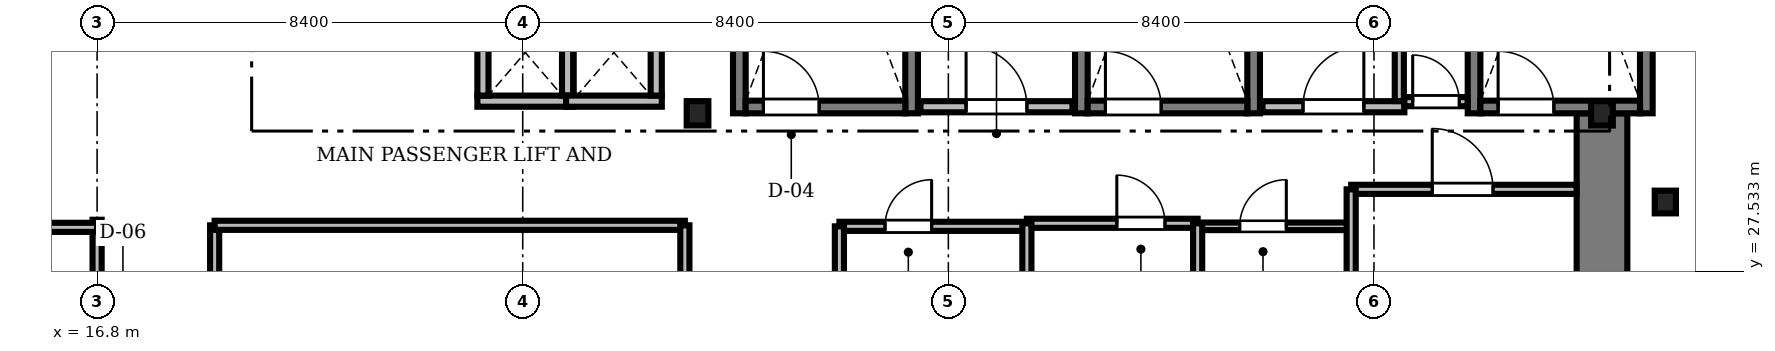
"""IFC4 building model, lengths in metres.
Left out: names, types, materials, properties, quantities, classifications, styles, units other than length and angle.
Written with IfcOpenShell. Run it as: python <this file> out.ifc"""

import sys

from ifc_helpers import new_model, si_unit, direction, frame, frame_2d, origin, origin_2d, place, context, subcontext, project, spatial, rectangle, i_section, extrude, source, transform, mapped, element, fill, save


model = new_model("IFC4")
c1 = context("Model", 3, precision=1e-05, world=origin(), true_north=direction((0.0, 1.0)))
c2 = subcontext(c1, "Body", "Model", "MODEL_VIEW")
j1 = project(units=[si_unit("LENGTHUNIT", "METRE"), si_unit("PLANEANGLEUNIT", "RADIAN")], contexts=[c1])
p1 = place(None, origin())
s1 = spatial("IfcSite", under=j1, at=p1, CompositionType="ELEMENT")
p2 = place(p1, origin())
s2 = spatial("IfcBuilding", under=s1, at=p2, CompositionType="ELEMENT")
p3 = place(p2, frame((0.0, 0.0, 56.8)))
s3 = spatial("IfcBuildingStorey", under=s2, at=p3, CompositionType="ELEMENT", Elevation=56.8)
m1 = source(origin(), c2, "Body", "SweptSolid", [
    extrude(rectangle(XDim=13.15, YDim=1.0, at=frame_2d((6.575, 0.0))), origin(), (0.0, 0.0, 1.0), 3.41),
])
p4 = place(p3, frame((46.5, 17.5, 0.0), z_axis=(0.0, 0.0, 1.0), x_axis=(0.0, 1.0, 0.0)))
e1 = element("IfcWall", 1, at=p4, inside=s3, PredefinedType="SHEAR", context=c2, shape_type="MappedRepresentation", body=[
    mapped(m1, transform((0.0, 0.0, 0.0), scale=1.0)),
])
m2 = source(origin(), c2, "Body", "SweptSolid", [
    extrude(i_section(OverallWidth=0.428, OverallDepth=0.481, WebThickness=0.04, FlangeThickness=0.063, FilletRadius=0.015, at=origin_2d()), origin(), (0.0, 0.0, 1.0), 3.41),
])
for number, where, z_axis, x_axis in (
    (2, (28.65, 30.65, 0.0), (0.0, 0.0, 1.0), (1.0, 0.0, 0.0)),
    (3, (46.5, 30.65, 0.0), (0.0, 0.0, 1.0), (1.0, 0.0, 0.0)),
):
    element("IfcColumn", number, at=place(p3, frame(where, z_axis=z_axis, x_axis=x_axis)), inside=s3, PredefinedType="COLUMN", context=c2, shape_type="MappedRepresentation", body=[
        mapped(m2, transform((0.0, 0.0, 0.0), scale=1.0)),
    ])
m3 = source(origin(), c2, "Body", "SweptSolid", [
    extrude(i_section(OverallWidth=0.419, OverallDepth=0.449, WebThickness=0.031, FlangeThickness=0.048, FilletRadius=0.015, at=origin_2d()), origin(), (0.0, 0.0, 1.0), 3.41),
])
p5 = place(p3, frame((47.75, 28.9, 0.0), z_axis=(0.0, 0.0, 1.0), x_axis=(1.0, 0.0, 0.0)))
e4 = element("IfcColumn", 4, at=p5, inside=s3, PredefinedType="COLUMN", context=c2, shape_type="MappedRepresentation", body=[
    mapped(m3, transform((0.0, 0.0, 0.0), scale=1.0)),
])
m4 = source(origin(), c2, "Body", "SweptSolid", [
    extrude(rectangle(XDim=9.15, YDim=0.25, at=frame_2d((4.575, 0.0))), origin(), (0.0, 0.0, 1.0), 3.45),
])
for number, where, z_axis, x_axis in (
    (5, (29.475, 30.65, 0.0), (0.0, 0.0, 1.0), (0.0, 1.0, 0.0)),
    (6, (32.875, 30.65, 0.0), (0.0, 0.0, 1.0), (0.0, 1.0, 0.0)),
):
    element("IfcWall", number, at=place(p3, frame(where, z_axis=z_axis, x_axis=x_axis)), inside=s3, PredefinedType="SOLIDWALL", context=c2, shape_type="MappedRepresentation", body=[
        mapped(m4, transform((0.0, 0.0, 0.0), scale=1.0)),
    ])
m5 = source(origin(), c2, "Body", "SweptSolid", [
    extrude(rectangle(XDim=3.15, YDim=0.25, at=frame_2d((1.575, 0.0))), origin(), (0.0, 0.0, 1.0), 3.45),
])
p6 = place(p3, frame((29.6, 30.775, 0.0), z_axis=(0.0, 0.0, 1.0), x_axis=(1.0, 0.0, 0.0)))
e7 = element("IfcWall", 7, at=p6, inside=s3, PredefinedType="SOLIDWALL", context=c2, shape_type="MappedRepresentation", body=[
    mapped(m5, transform((0.0, 0.0, 0.0), scale=1.0)),
])
m6 = source(origin(), c2, "Body", "SweptSolid", [
    extrude(rectangle(XDim=1.1, YDim=2.2, at=frame_2d((0.55, 1.1))), frame((0.0, 0.135, 0.0), z_axis=(0.0, -1.0, 0.0), x_axis=(1.0, 0.0, 0.0)), (0.0, 0.0, 1.0), 0.27),
])
p7 = place(p6, frame((0.35, 0.0, 0.0)))
e8 = element("IfcOpeningElement", 8, at=p7, cuts=e7, PredefinedType="OPENING", context=c2, shape_type="MappedRepresentation", body=[
    mapped(m6, transform((0.0, 0.0, 0.0), scale=1.0)),
])
for number, where, z_axis, x_axis in (
    (9, (36.225, 30.65, 0.0), (0.0, 0.0, 1.0), (0.0, 1.0, 0.0)),
    (10, (39.625, 30.65, 0.0), (0.0, 0.0, 1.0), (0.0, 1.0, 0.0)),
):
    element("IfcWall", number, at=place(p3, frame(where, z_axis=z_axis, x_axis=x_axis)), inside=s3, PredefinedType="SOLIDWALL", context=c2, shape_type="MappedRepresentation", body=[
        mapped(m4, transform((0.0, 0.0, 0.0), scale=1.0)),
    ])
p8 = place(p3, frame((36.35, 30.775, 0.0), z_axis=(0.0, 0.0, 1.0), x_axis=(1.0, 0.0, 0.0)))
e11 = element("IfcWall", 11, at=p8, inside=s3, PredefinedType="SOLIDWALL", context=c2, shape_type="MappedRepresentation", body=[
    mapped(m5, transform((0.0, 0.0, 0.0), scale=1.0)),
])
p9 = place(p8, frame((0.35, 0.0, 0.0)))
e12 = element("IfcOpeningElement", 12, at=p9, cuts=e11, PredefinedType="OPENING", context=c2, shape_type="MappedRepresentation", body=[
    mapped(m6, transform((0.0, 0.0, 0.0), scale=1.0)),
])
for number, where, z_axis, x_axis in (
    (13, (43.975, 30.65, 0.0), (0.0, 0.0, 1.0), (0.0, 1.0, 0.0)),
    (14, (47.375, 30.65, 0.0), (0.0, 0.0, 1.0), (0.0, 1.0, 0.0)),
):
    element("IfcWall", number, at=place(p3, frame(where, z_axis=z_axis, x_axis=x_axis)), inside=s3, PredefinedType="SOLIDWALL", context=c2, shape_type="MappedRepresentation", body=[
        mapped(m4, transform((0.0, 0.0, 0.0), scale=1.0)),
    ])
p10 = place(p3, frame((44.1, 30.775, 0.0), z_axis=(0.0, 0.0, 1.0), x_axis=(1.0, 0.0, 0.0)))
e15 = element("IfcWall", 15, at=p10, inside=s3, PredefinedType="SOLIDWALL", context=c2, shape_type="MappedRepresentation", body=[
    mapped(m5, transform((0.0, 0.0, 0.0), scale=1.0)),
])
p11 = place(p10, frame((0.35, 0.0, 0.0)))
e16 = element("IfcOpeningElement", 16, at=p11, cuts=e15, PredefinedType="OPENING", context=c2, shape_type="MappedRepresentation", body=[
    mapped(m6, transform((0.0, 0.0, 0.0), scale=1.0)),
])
m7 = source(origin(), c2, "Body", "SweptSolid", [
    extrude(rectangle(XDim=3.0, YDim=0.22, at=frame_2d((1.5, 0.0))), origin(), (0.0, 0.0, 1.0), 3.41),
])
p12 = place(p3, frame((33.05, 30.78, 0.0), z_axis=(0.0, 0.0, 1.0), x_axis=(1.0, 0.0, 0.0)))
e17 = element("IfcWall", 17, at=p12, inside=s3, PredefinedType="SOLIDWALL", context=c2, shape_type="MappedRepresentation", body=[
    mapped(m7, transform((0.0, 0.0, 0.0), scale=1.0)),
])
m8 = source(origin(), c2, "Body", "SweptSolid", [
    extrude(rectangle(XDim=1.2, YDim=2.2, at=frame_2d((0.6, 1.1))), frame((0.0, 0.12, 0.0), z_axis=(0.0, -1.0, 0.0), x_axis=(1.0, 0.0, 0.0)), (0.0, 0.0, 1.0), 0.24),
])
p13 = place(p12, frame((0.9, 0.0, 0.0)))
e18 = element("IfcOpeningElement", 18, at=p13, cuts=e17, PredefinedType="OPENING", context=c2, shape_type="MappedRepresentation", body=[
    mapped(m8, transform((0.0, 0.0, 0.0), scale=1.0)),
])
m9 = source(origin(), c2, "Body", "SweptSolid", [
    extrude(rectangle(XDim=2.8, YDim=0.22, at=frame_2d((1.4, 0.0))), origin(), (0.0, 0.0, 1.0), 3.41),
])
p14 = place(p3, frame((39.8, 30.78, 0.0), z_axis=(0.0, 0.0, 1.0), x_axis=(1.0, 0.0, 0.0)))
e19 = element("IfcWall", 19, at=p14, inside=s3, PredefinedType="SOLIDWALL", context=c2, shape_type="MappedRepresentation", body=[
    mapped(m9, transform((0.0, 0.0, 0.0), scale=1.0)),
])
p15 = place(p14, frame((0.8, 0.0, 0.0)))
e20 = element("IfcOpeningElement", 20, at=p15, cuts=e19, PredefinedType="OPENING", context=c2, shape_type="MappedRepresentation", body=[
    mapped(m8, transform((0.0, 0.0, 0.0), scale=1.0)),
])
m10 = source(origin(), c2, "Body", "SweptSolid", [
    extrude(rectangle(XDim=1.89, YDim=0.22, at=frame_2d((0.945, 0.0))), origin(), (0.0, 0.0, 1.0), 3.41),
])
p16 = place(p3, frame((24.305, 30.89, 0.0), z_axis=(0.0, 0.0, 1.0), x_axis=(1.0, 0.0, 0.0)))
e21 = element("IfcWall", 21, at=p16, inside=s3, PredefinedType="SOLIDWALL", context=c2, shape_type="MappedRepresentation", body=[
    mapped(m10, transform((0.0, 0.0, 0.0), scale=1.0)),
])
m11 = source(origin(), c2, "Body", "SweptSolid", [
    extrude(rectangle(XDim=1.7, YDim=0.22, at=frame_2d((0.85, 0.0))), origin(), (0.0, 0.0, 1.0), 3.41),
])
for number, where, z_axis, x_axis in (
    (22, (24.415, 31.0, 0.0), (0.0, 0.0, 1.0), (0.0, 1.0, 0.0)),
    (23, (26.085, 31.0, 0.0), (0.0, 0.0, 1.0), (0.0, 1.0, 0.0)),
):
    element("IfcWall", number, at=place(p3, frame(where, z_axis=z_axis, x_axis=x_axis)), inside=s3, PredefinedType="SOLIDWALL", context=c2, shape_type="MappedRepresentation", body=[
        mapped(m11, transform((0.0, 0.0, 0.0), scale=1.0)),
    ])
p17 = place(p3, frame((26.055, 30.89, 0.0), z_axis=(0.0, 0.0, 1.0), x_axis=(1.0, 0.0, 0.0)))
e24 = element("IfcWall", 24, at=p17, inside=s3, PredefinedType="SOLIDWALL", context=c2, shape_type="MappedRepresentation", body=[
    mapped(m10, transform((0.0, 0.0, 0.0), scale=1.0)),
])
p18 = place(p3, frame((27.835, 31.0, 0.0), z_axis=(0.0, 0.0, 1.0), x_axis=(0.0, 1.0, 0.0)))
e25 = element("IfcWall", 25, at=p18, inside=s3, PredefinedType="SOLIDWALL", context=c2, shape_type="MappedRepresentation", body=[
    mapped(m11, transform((0.0, 0.0, 0.0), scale=1.0)),
])
m12 = source(origin(), c2, "Body", "SweptSolid", [
    extrude(rectangle(XDim=13.7, YDim=0.18, at=frame_2d((6.85, 0.0))), origin(), (0.0, 0.0, 1.0), 2.802),
])
p19 = place(p3, frame((16.8, 14.85, 0.0), z_axis=(0.0, 0.0, 1.0), x_axis=(0.0, 1.0, 0.0)))
e26 = element("IfcWall", 26, at=p19, inside=s3, PredefinedType="PARTITIONING", context=c2, shape_type="MappedRepresentation", body=[
    mapped(m12, transform((0.0, 0.0, 0.0), scale=1.0)),
])
m13 = source(origin(), c2, "Body", "SweptSolid", [
    extrude(rectangle(XDim=1.05, YDim=2.2, at=frame_2d((0.525, 1.1))), frame((0.0, 0.1, 0.0), z_axis=(0.0, -1.0, 0.0), x_axis=(1.0, 0.0, 0.0)), (0.0, 0.0, 1.0), 0.2),
])
p20 = place(p19, frame((2.867, 0.0, 0.0)))
e27 = element("IfcOpeningElement", 27, at=p20, cuts=e26, PredefinedType="OPENING", context=c2, shape_type="MappedRepresentation", body=[
    mapped(m13, transform((0.0, 0.0, 0.0), scale=1.0)),
])
m14 = source(origin(), c2, "Body", "SweptSolid", [
    extrude(rectangle(XDim=0.95, YDim=2.15, at=frame_2d((0.475, 1.075))), frame((0.0, 0.1, 0.0), z_axis=(0.0, -1.0, 0.0), x_axis=(1.0, 0.0, 0.0)), (0.0, 0.0, 1.0), 0.2),
])
p21 = place(p19, frame((10.867, 0.0, 0.0)))
e28 = element("IfcOpeningElement", 28, at=p21, cuts=e26, PredefinedType="OPENING", context=c2, shape_type="MappedRepresentation", body=[
    mapped(m14, transform((0.0, 0.0, 0.0), scale=1.0)),
])
m15 = source(origin(), c2, "Body", "SweptSolid", [
    extrude(rectangle(XDim=4.448, YDim=0.18, at=frame_2d((2.224, 0.0))), origin(), (0.0, 0.0, 1.0), 3.042),
])
p22 = place(p3, frame((41.55, 29.15, 0.0), z_axis=(0.0, 0.0, 1.0), x_axis=(1.0, 0.0, 0.0)))
e29 = element("IfcWall", 29, at=p22, inside=s3, PredefinedType="PARTITIONING", context=c2, shape_type="MappedRepresentation", body=[
    mapped(m15, transform((0.0, 0.0, 0.0), scale=1.0)),
])
m16 = source(origin(), c2, "Body", "SweptSolid", [
    extrude(rectangle(XDim=1.2, YDim=2.2, at=frame_2d((0.6, 1.1))), frame((0.0, 0.1, 0.0), z_axis=(0.0, -1.0, 0.0), x_axis=(1.0, 0.0, 0.0)), (0.0, 0.0, 1.0), 0.2),
])
p23 = place(p22, frame((1.6, 0.0, 0.0)))
e30 = element("IfcOpeningElement", 30, at=p23, cuts=e29, PredefinedType="OPENING", context=c2, shape_type="MappedRepresentation", body=[
    mapped(m16, transform((0.0, 0.0, 0.0), scale=1.0)),
])
m17 = source(origin(), c2, "Body", "SweptSolid", [
    extrude(rectangle(XDim=4.24, YDim=0.18, at=frame_2d((2.12, 0.0))), origin(), (0.0, 0.0, 1.0), 2.802),
])
p24 = place(p3, frame((19.12, 24.2, 0.0), z_axis=(0.0, 0.0, 1.0), x_axis=(0.0, 1.0, 0.0)))
e31 = element("IfcWall", 31, at=p24, inside=s3, PredefinedType="PARTITIONING", context=c2, shape_type="MappedRepresentation", body=[
    mapped(m17, transform((0.0, 0.0, 0.0), scale=1.0)),
])
p25 = place(p24, frame((1.4, 0.0, 0.0)))
e32 = element("IfcOpeningElement", 32, at=p25, cuts=e31, PredefinedType="OPENING", context=c2, shape_type="MappedRepresentation", body=[
    mapped(m13, transform((0.0, 0.0, 0.0), scale=1.0)),
])
m18 = source(origin(), c2, "Body", "SweptSolid", [
    extrude(rectangle(XDim=3.7, YDim=0.18, at=frame_2d((1.85, 0.0))), origin(), (0.0, 0.0, 1.0), 3.042),
])
p26 = place(p3, frame((31.45, 28.42, 0.0), z_axis=(0.0, 0.0, 1.0), x_axis=(1.0, 0.0, 0.0)))
e33 = element("IfcWall", 33, at=p26, inside=s3, PredefinedType="PARTITIONING", context=c2, shape_type="MappedRepresentation", body=[
    mapped(m18, transform((0.0, 0.0, 0.0), scale=1.0)),
])
m19 = source(origin(), c2, "Body", "SweptSolid", [
    extrude(rectangle(XDim=0.92, YDim=2.1, at=frame_2d((0.46, 1.05))), frame((0.0, 0.1, 0.0), z_axis=(0.0, -1.0, 0.0), x_axis=(1.0, 0.0, 0.0)), (0.0, 0.0, 1.0), 0.2),
])
p27 = place(p26, frame((0.9, 0.0, 0.0)))
e34 = element("IfcOpeningElement", 34, at=p27, cuts=e33, PredefinedType="OPENING", context=c2, shape_type="MappedRepresentation", body=[
    mapped(m19, transform((0.0, 0.0, 0.0), scale=1.0)),
])
m20 = source(origin(), c2, "Body", "SweptSolid", [
    extrude(rectangle(XDim=3.37, YDim=0.18, at=frame_2d((1.685, 0.0))), origin(), (0.0, 0.0, 1.0), 3.41),
])
p28 = place(p3, frame((35.15, 28.48, 0.0), z_axis=(0.0, 0.0, 1.0), x_axis=(1.0, 0.0, 0.0)))
e35 = element("IfcWall", 35, at=p28, inside=s3, PredefinedType="PARTITIONING", context=c2, shape_type="MappedRepresentation", body=[
    mapped(m20, transform((0.0, 0.0, 0.0), scale=1.0)),
])
p29 = place(p28, frame((1.775, 0.0, 0.0)))
e36 = element("IfcOpeningElement", 36, at=p29, cuts=e35, PredefinedType="OPENING", context=c2, shape_type="MappedRepresentation", body=[
    mapped(m14, transform((0.0, 0.0, 0.0), scale=1.0)),
])
m21 = source(origin(), c2, "Body", "SweptSolid", [
    extrude(rectangle(XDim=3.0, YDim=0.15, at=frame_2d((1.5, 0.0))), origin(), (0.0, 0.0, 1.0), 3.41),
])
p30 = place(p3, frame((38.52, 28.42, 0.0), z_axis=(0.0, 0.0, 1.0), x_axis=(1.0, 0.0, 0.0)))
e37 = element("IfcWall", 37, at=p30, inside=s3, PredefinedType="PARTITIONING", context=c2, shape_type="MappedRepresentation", body=[
    mapped(m21, transform((0.0, 0.0, 0.0), scale=1.0)),
])
m22 = source(origin(), c2, "Body", "SweptSolid", [
    extrude(rectangle(XDim=0.92, YDim=2.1, at=frame_2d((0.46, 1.05))), frame((0.0, 0.085, 0.0), z_axis=(0.0, -1.0, 0.0), x_axis=(1.0, 0.0, 0.0)), (0.0, 0.0, 1.0), 0.17),
])
p31 = place(p30, frame((0.83, 0.0, 0.0)))
e38 = element("IfcOpeningElement", 38, at=p31, cuts=e37, PredefinedType="OPENING", context=c2, shape_type="MappedRepresentation", body=[
    mapped(m22, transform((0.0, 0.0, 0.0), scale=1.0)),
])
m23 = source(origin(), c2, "Body", "SweptSolid", [
    extrude(rectangle(XDim=1.248, YDim=0.18, at=frame_2d((0.624, 0.0))), origin(), (0.0, 0.0, 1.0), 3.41),
])
p32 = place(p3, frame((42.6, 30.88, 0.0), z_axis=(0.0, 0.0, 1.0), x_axis=(1.0, 0.0, 0.0)))
e39 = element("IfcWall", 39, at=p32, inside=s3, PredefinedType="PARTITIONING", context=c2, shape_type="MappedRepresentation", body=[
    mapped(m23, transform((0.0, 0.0, 0.0), scale=1.0)),
])
p33 = place(p32, frame((0.164, 0.0, 0.0)))
e40 = element("IfcOpeningElement", 40, at=p33, cuts=e39, PredefinedType="OPENING", context=c2, shape_type="MappedRepresentation", body=[
    mapped(m19, transform((0.0, 0.0, 0.0), scale=1.0)),
])
m24 = source(origin(), c2, "Body", "SweptSolid", [
    extrude(rectangle(XDim=14.57, YDim=0.18, at=frame_2d((7.285, 0.0))), origin(), (0.0, 0.0, 1.0), 2.652),
])
p34 = place(p3, frame((2.23, 28.4, 0.0), z_axis=(0.0, 0.0, 1.0), x_axis=(1.0, 0.0, 0.0)))
e41 = element("IfcWall", 41, at=p34, inside=s3, PredefinedType="PARTITIONING", context=c2, shape_type="MappedRepresentation", body=[
    mapped(m24, transform((0.0, 0.0, 0.0), scale=1.0)),
])
m25 = source(origin(), c2, "Body", "SweptSolid", [
    extrude(rectangle(XDim=9.28, YDim=0.18, at=frame_2d((4.64, 0.0))), origin(), (0.0, 0.0, 1.0), 3.41),
])
p35 = place(p3, frame((19.12, 28.44, 0.0), z_axis=(0.0, 0.0, 1.0), x_axis=(1.0, 0.0, 0.0)))
e42 = element("IfcWall", 42, at=p35, inside=s3, PredefinedType="PARTITIONING", context=c2, shape_type="MappedRepresentation", body=[
    mapped(m25, transform((0.0, 0.0, 0.0), scale=1.0)),
])
p36 = place(p3, frame((28.4, 24.2, 0.0), z_axis=(0.0, 0.0, 1.0), x_axis=(0.0, 1.0, 0.0)))
e43 = element("IfcWall", 43, at=p36, inside=s3, PredefinedType="PARTITIONING", context=c2, shape_type="MappedRepresentation", body=[
    mapped(m17, transform((0.0, 0.0, 0.0), scale=1.0)),
])
m26 = source(origin(), c2, "Body", "SweptSolid", [
    extrude(rectangle(XDim=2.35, YDim=0.18, at=frame_2d((1.175, 0.0))), origin(), (0.0, 0.0, 1.0), 2.802),
])
p37 = place(p3, frame((41.55, 26.8, 0.0), z_axis=(0.0, 0.0, 1.0), x_axis=(0.0, 1.0, 0.0)))
e44 = element("IfcWall", 44, at=p37, inside=s3, PredefinedType="PARTITIONING", context=c2, shape_type="MappedRepresentation", body=[
    mapped(m26, transform((0.0, 0.0, 0.0), scale=1.0)),
])
m27 = source(origin(), c2, "Body", "SweptSolid", [
    extrude(rectangle(XDim=1.858, YDim=0.18, at=frame_2d((0.929, 0.0))), origin(), (0.0, 0.0, 1.0), 3.41),
])
p38 = place(p3, frame((42.5, 30.892, 0.0), z_axis=(0.0, 0.0, 1.0), x_axis=(0.0, 1.0, 0.0)))
e45 = element("IfcWall", 45, at=p38, inside=s3, PredefinedType="PARTITIONING", context=c2, shape_type="MappedRepresentation", body=[
    mapped(m27, transform((0.0, 0.0, 0.0), scale=1.0)),
])
m28 = source(origin(), c2, "Body", "SweptSolid", [
    extrude(rectangle(XDim=1.66, YDim=0.18, at=frame_2d((0.83, 0.0))), origin(), (0.0, 0.0, 1.0), 2.952),
])
for number, where, z_axis, x_axis in (
    (46, (35.15, 26.82, 0.0), (0.0, 0.0, 1.0), (0.0, 1.0, 0.0)),
    (47, (38.52, 26.82, 0.0), (0.0, 0.0, 1.0), (0.0, 1.0, 0.0)),
):
    element("IfcWall", number, at=place(p3, frame(where, z_axis=z_axis, x_axis=x_axis)), inside=s3, PredefinedType="PARTITIONING", context=c2, shape_type="MappedRepresentation", body=[
        mapped(m28, transform((0.0, 0.0, 0.0), scale=1.0)),
    ])
m29 = source(origin(), c2, "Body", "SweptSolid", [
    extrude(rectangle(XDim=1.6, YDim=0.18, at=frame_2d((0.8, 0.0))), origin(), (0.0, 0.0, 1.0), 2.952),
])
p39 = place(p3, frame((31.45, 26.82, 0.0), z_axis=(0.0, 0.0, 1.0), x_axis=(0.0, 1.0, 0.0)))
e48 = element("IfcWall", 48, at=p39, inside=s3, PredefinedType="PARTITIONING", context=c2, shape_type="MappedRepresentation", body=[
    mapped(m29, transform((0.0, 0.0, 0.0), scale=1.0)),
])
m30 = source(origin(), c2, "Body", "SweptSolid", [
    extrude(rectangle(XDim=1.1, YDim=2.2, at=frame_2d((0.55, 1.1))), frame((0.0, 0.025, 0.0), z_axis=(0.0, -1.0, 0.0), x_axis=(1.0, 0.0, 0.0)), (0.0, 0.0, 1.0), 0.05),
])
p40 = place(p7, origin())
e49 = element("IfcDoor", 49, at=p40, inside=s3, OperationType="SINGLE_SWING_LEFT", PredefinedType="DOOR", context=c2, shape_type="MappedRepresentation", body=[
    mapped(m30, transform((0.0, 0.0, 0.0), scale=1.0)),
])
fill(e8, e49)
p41 = place(p9, origin())
e50 = element("IfcDoor", 50, at=p41, inside=s3, OperationType="SINGLE_SWING_LEFT", PredefinedType="DOOR", context=c2, shape_type="MappedRepresentation", body=[
    mapped(m30, transform((0.0, 0.0, 0.0), scale=1.0)),
])
fill(e12, e50)
p42 = place(p11, origin())
e51 = element("IfcDoor", 51, at=p42, inside=s3, OperationType="SINGLE_SWING_LEFT", PredefinedType="DOOR", context=c2, shape_type="MappedRepresentation", body=[
    mapped(m30, transform((0.0, 0.0, 0.0), scale=1.0)),
])
fill(e16, e51)
m31 = source(origin(), c2, "Body", "SweptSolid", [
    extrude(rectangle(XDim=1.2, YDim=2.2, at=frame_2d((0.6, 1.1))), frame((0.0, 0.025, 0.0), z_axis=(0.0, -1.0, 0.0), x_axis=(1.0, 0.0, 0.0)), (0.0, 0.0, 1.0), 0.05),
])
p43 = place(p13, origin())
e52 = element("IfcDoor", 52, at=p43, inside=s3, OperationType="SINGLE_SWING_LEFT", PredefinedType="DOOR", context=c2, shape_type="MappedRepresentation", body=[
    mapped(m31, transform((0.0, 0.0, 0.0), scale=1.0)),
])
fill(e18, e52)
p44 = place(p15, origin())
e53 = element("IfcDoor", 53, at=p44, inside=s3, OperationType="SINGLE_SWING_RIGHT", PredefinedType="DOOR", context=c2, shape_type="MappedRepresentation", body=[
    mapped(m31, transform((0.0, 0.0, 0.0), scale=1.0)),
])
fill(e20, e53)
p45 = place(p23, origin())
e54 = element("IfcDoor", 54, at=p45, inside=s3, OperationType="SINGLE_SWING_LEFT", PredefinedType="DOOR", context=c2, shape_type="MappedRepresentation", body=[
    mapped(m31, transform((0.0, 0.0, 0.0), scale=1.0)),
])
fill(e30, e54)
m32 = source(origin(), c2, "Body", "SweptSolid", [
    extrude(rectangle(XDim=0.92, YDim=2.1, at=frame_2d((0.46, 1.05))), frame((0.0, 0.025, 0.0), z_axis=(0.0, -1.0, 0.0), x_axis=(1.0, 0.0, 0.0)), (0.0, 0.0, 1.0), 0.05),
])
p46 = place(p27, origin())
e55 = element("IfcDoor", 55, at=p46, inside=s3, OperationType="SINGLE_SWING_RIGHT", PredefinedType="DOOR", context=c2, shape_type="MappedRepresentation", body=[
    mapped(m32, transform((0.0, 0.0, 0.0), scale=1.0)),
])
fill(e34, e55)
m33 = source(origin(), c2, "Body", "SweptSolid", [
    extrude(rectangle(XDim=0.95, YDim=2.15, at=frame_2d((0.475, 1.075))), frame((0.0, 0.025, 0.0), z_axis=(0.0, -1.0, 0.0), x_axis=(1.0, 0.0, 0.0)), (0.0, 0.0, 1.0), 0.05),
])
p47 = place(p29, origin())
e56 = element("IfcDoor", 56, at=p47, inside=s3, OperationType="SINGLE_SWING_LEFT", PredefinedType="DOOR", context=c2, shape_type="MappedRepresentation", body=[
    mapped(m33, transform((0.0, 0.0, 0.0), scale=1.0)),
])
fill(e36, e56)
p48 = place(p31, origin())
e57 = element("IfcDoor", 57, at=p48, inside=s3, OperationType="SINGLE_SWING_RIGHT", PredefinedType="DOOR", context=c2, shape_type="MappedRepresentation", body=[
    mapped(m32, transform((0.0, 0.0, 0.0), scale=1.0)),
])
fill(e38, e57)
p49 = place(p33, origin())
e58 = element("IfcDoor", 58, at=p49, inside=s3, OperationType="SINGLE_SWING_LEFT", PredefinedType="DOOR", context=c2, shape_type="MappedRepresentation", body=[
    mapped(m32, transform((0.0, 0.0, 0.0), scale=1.0)),
])
fill(e40, e58)
save(model, sys.argv[1])
